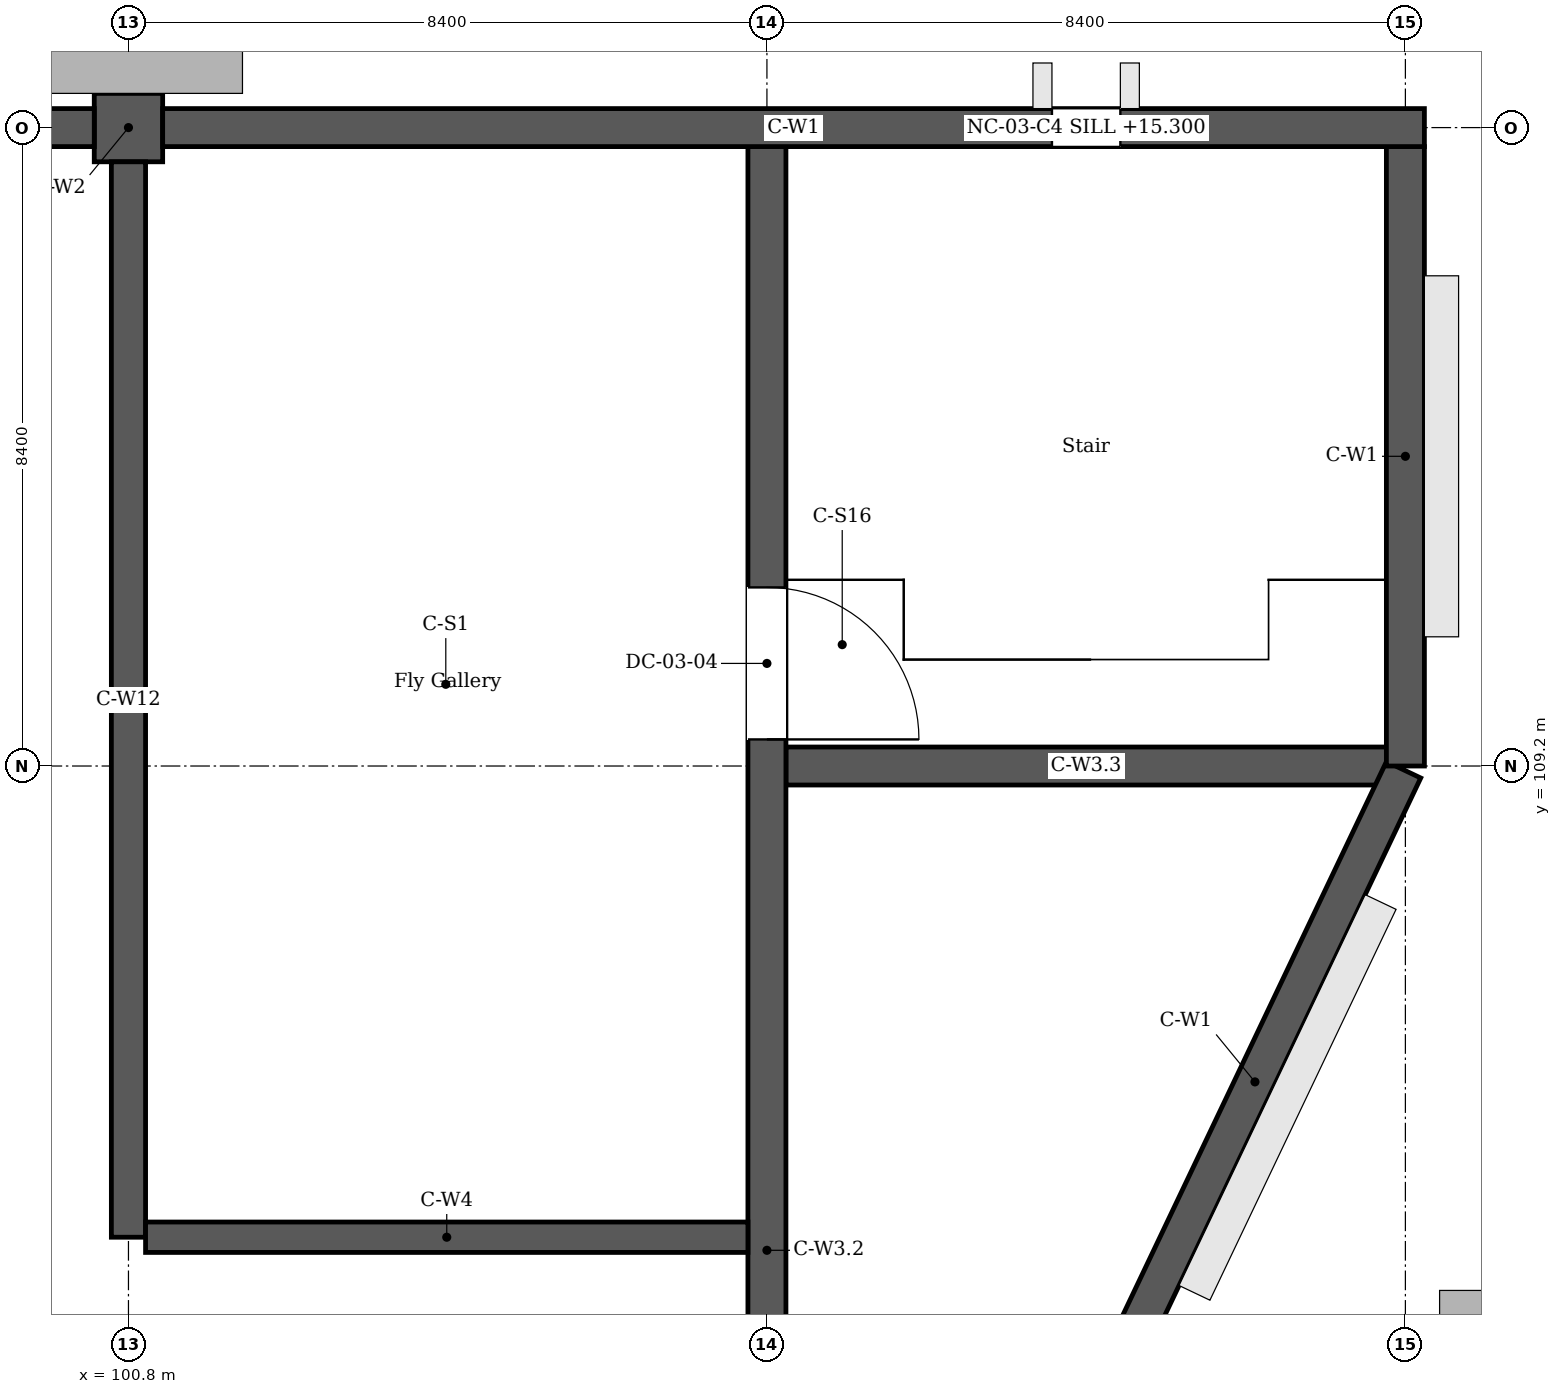
"""IFC4 building model, lengths in metres.
Left out: names, types, materials, properties, quantities, classifications, styles, units other than length and angle.
Written with IfcOpenShell. Run it as: python <this file> out.ifc"""

import sys

from ifc_helpers import new_model, si_unit, direction, frame, frame_2d, origin, place, context, subcontext, project, spatial, rectangle, extrude, element, fill, save


model = new_model("IFC4")
c1 = context("Model", 3, precision=1e-05, world=origin(), true_north=direction((0.0, 1.0)))
c2 = subcontext(c1, "Body", "Model", "MODEL_VIEW")
j1 = project(units=[si_unit("LENGTHUNIT", "METRE"), si_unit("PLANEANGLEUNIT", "RADIAN")], contexts=[c1])
p1 = place(None, origin())
s1 = spatial("IfcSite", under=j1, at=p1, CompositionType="ELEMENT")
p2 = place(p1, origin())
s2 = spatial("IfcBuilding", under=s1, at=p2, CompositionType="ELEMENT")
p3 = place(p2, frame((0.0, 0.0, 14.4)))
s3 = spatial("IfcBuildingStorey", under=s2, at=p3, CompositionType="ELEMENT", Elevation=14.4)
p4 = place(p3, frame((117.576, 109.15, 0.0), z_axis=(0.0, 0.0, 1.0), x_axis=(-0.429931496654, -0.902861511077, 0.0)))
e1 = element("IfcWall", 1, at=p4, inside=s3, PredefinedType="SOLIDWALL", context=c2, shape_type="SweptSolid", body=[
    extrude(rectangle(XDim=9.096, YDim=0.5, at=frame_2d((4.548, 0.0))), origin(), (0.0, 0.0, 1.0), 4.2),
])
p5 = place(p3, frame((117.6, 117.35, 0.0), z_axis=(0.0, 0.0, 1.0), x_axis=(0.0, -1.0, 0.0)))
e2 = element("IfcWall", 2, at=p5, inside=s3, PredefinedType="SOLIDWALL", context=c2, shape_type="SweptSolid", body=[
    extrude(rectangle(XDim=8.15, YDim=0.5, at=frame_2d((4.075, 0.0))), origin(), (0.0, 0.0, 1.0), 4.2),
])
p6 = place(p3, frame((101.25, 117.6, 0.0), z_axis=(0.0, 0.0, 1.0), x_axis=(1.0, 0.0, 0.0)))
e3 = element("IfcWall", 3, at=p6, inside=s3, PredefinedType="SOLIDWALL", context=c2, shape_type="SweptSolid", body=[
    extrude(rectangle(XDim=16.6, YDim=0.5, at=frame_2d((8.3, 0.0))), origin(), (0.0, 0.0, 1.0), 4.2),
])
p7 = place(p6, frame((11.7, 0.0, 0.9)))
e4 = element("IfcOpeningElement", 4, at=p7, cuts=e3, PredefinedType="OPENING", context=c2, shape_type="SweptSolid", body=[
    extrude(rectangle(XDim=0.9, YDim=2.4, at=frame_2d((0.45, 1.2))), frame((0.0, 0.26, 0.0), z_axis=(0.0, -1.0, 0.0), x_axis=(1.0, 0.0, 0.0)), (0.0, 0.0, 1.0), 0.52),
])
p8 = place(p3, frame((92.85, 117.6, 0.0), z_axis=(0.0, 0.0, 1.0), x_axis=(1.0, 0.0, 0.0)))
e5 = element("IfcWall", 5, at=p8, inside=s3, PredefinedType="SOLIDWALL", context=c2, shape_type="SweptSolid", body=[
    extrude(rectangle(XDim=7.5, YDim=0.5, at=frame_2d((3.75, 0.0))), origin(), (0.0, 0.0, 1.0), 4.2),
])
p9 = place(p3, frame((101.25, 117.6, 0.0), z_axis=(0.0, 0.0, 1.0), x_axis=(-1.0, 0.0, 0.0)))
e6 = element("IfcWall", 6, at=p9, inside=s3, PredefinedType="SOLIDWALL", context=c2, shape_type="SweptSolid", body=[
    extrude(rectangle(XDim=0.9, YDim=0.9, at=frame_2d((0.45, 0.0))), origin(), (0.0, 0.0, 1.0), 4.2),
])
p10 = place(p3, frame((109.2, 117.35, 0.0), z_axis=(0.0, 0.0, 1.0), x_axis=(0.0, -1.0, 0.0)))
e7 = element("IfcWall", 7, at=p10, inside=s3, PredefinedType="SOLIDWALL", context=c2, shape_type="SweptSolid", body=[
    extrude(rectangle(XDim=41.5, YDim=0.5, at=frame_2d((20.75, 0.0))), origin(), (0.0, 0.0, 1.0), 4.2),
])
p11 = place(p10, frame((5.8, 0.0, 0.0)))
e8 = element("IfcOpeningElement", 8, at=p11, cuts=e7, PredefinedType="OPENING", context=c2, shape_type="SweptSolid", body=[
    extrude(rectangle(XDim=2.0, YDim=2.1, at=frame_2d((1.0, 1.05))), frame((0.0, 0.26, 0.0), z_axis=(0.0, -1.0, 0.0), x_axis=(1.0, 0.0, 0.0)), (0.0, 0.0, 1.0), 0.52),
])
p12 = place(p3, frame((100.8, 103.0, 0.0), z_axis=(0.0, 0.0, 1.0), x_axis=(0.0, 1.0, 0.0)))
e9 = element("IfcWall", 9, at=p12, inside=s3, PredefinedType="SOLIDWALL", context=c2, shape_type="SweptSolid", body=[
    extrude(rectangle(XDim=14.15, YDim=0.45, at=frame_2d((7.075, 0.0))), origin(), (0.0, 0.0, 1.0), 4.2),
])
p13 = place(p3, frame((101.025, 103.0, 0.0), z_axis=(0.0, 0.0, 1.0), x_axis=(1.0, 0.0, 0.0)))
e10 = element("IfcWall", 10, at=p13, inside=s3, PredefinedType="SOLIDWALL", context=c2, shape_type="SweptSolid", body=[
    extrude(rectangle(XDim=7.925, YDim=0.4, at=frame_2d((3.962, 0.0))), origin(), (0.0, 0.0, 1.0), 4.2),
])
p14 = place(p3, frame((109.45, 109.2, 0.0), z_axis=(0.0, 0.0, 1.0), x_axis=(1.0, 0.0, 0.0)))
e11 = element("IfcWall", 11, at=p14, inside=s3, PredefinedType="SOLIDWALL", context=c2, shape_type="SweptSolid", body=[
    extrude(rectangle(XDim=7.9, YDim=0.5, at=frame_2d((3.95, 0.0))), origin(), (0.0, 0.0, 1.0), 3.8),
])
p15 = place(p7, origin())
e12 = element("IfcWindow", 12, at=p15, inside=s3, PartitioningType="SINGLE_PANEL", PredefinedType="WINDOW", context=c2, shape_type="SweptSolid", body=[
    extrude(rectangle(XDim=0.9, YDim=2.4, at=frame_2d((0.45, 1.2))), frame((0.0, 0.03, 0.0), z_axis=(0.0, -1.0, 0.0), x_axis=(1.0, 0.0, 0.0)), (0.0, 0.0, 1.0), 0.06),
])
fill(e4, e12)
p16 = place(p11, origin())
e13 = element("IfcDoor", 13, at=p16, inside=s3, OperationType="DOUBLE_DOOR_DOUBLE_SWING", PredefinedType="DOOR", context=c2, shape_type="SweptSolid", body=[
    extrude(rectangle(XDim=2.0, YDim=2.1, at=frame_2d((1.0, 1.05))), frame((0.0, 0.025, 0.0), z_axis=(0.0, -1.0, 0.0), x_axis=(1.0, 0.0, 0.0)), (0.0, 0.0, 1.0), 0.05),
])
fill(e8, e13)
save(model, sys.argv[1])
